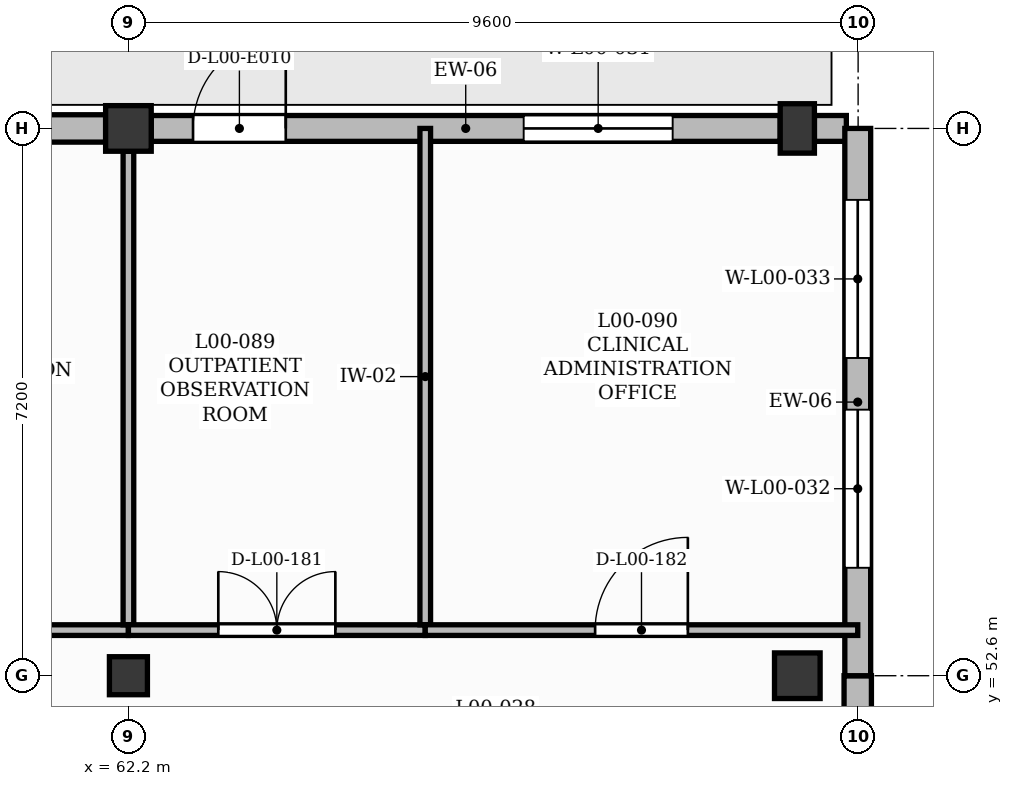
"""IFC4 building model, lengths in metres.
Left out: names, types, materials, properties, quantities, classifications, styles, units other than length and angle.
Written with IfcOpenShell. Run it as: python <this file> out.ifc"""

import sys

from ifc_helpers import new_model, si_unit, direction, frame, frame_2d, origin, origin_2d, place, context, subcontext, project, spatial, rectangle, extrude, element, fill, save


model = new_model("IFC4")
c1 = context("Model", 3, precision=1e-05, world=origin(), true_north=direction((0.0, 1.0)))
c2 = subcontext(c1, "Body", "Model", "MODEL_VIEW")
j1 = project(units=[si_unit("LENGTHUNIT", "METRE"), si_unit("PLANEANGLEUNIT", "RADIAN")], contexts=[c1])
p1 = place(None, origin())
s1 = spatial("IfcSite", under=j1, at=p1, CompositionType="ELEMENT")
p2 = place(p1, origin())
s2 = spatial("IfcBuilding", under=s1, at=p2, CompositionType="ELEMENT")
p3 = place(p2, origin())
s3 = spatial("IfcBuildingStorey", under=s2, at=p3, CompositionType="ELEMENT", Elevation=0.0)
p4 = place(p3, frame((62.2, 52.6, 0.0), z_axis=(0.0, 0.0, 1.0), x_axis=(1.0, 0.0, 0.0)))
e1 = element("IfcColumn", 1, at=p4, inside=s3, PredefinedType="COLUMN", context=c2, shape_type="SweptSolid", body=[
    extrude(rectangle(XDim=0.5, YDim=0.5, at=origin_2d()), origin(), (0.0, 0.0, 1.0), 4.2),
])
for number, where, z_axis, x_axis in (
    (2, (62.2, 59.8, 0.0), (0.0, 0.0, 1.0), (1.0, 0.0, 0.0)),
    (3, (71.0, 52.6, 0.0), (0.0, 0.0, 1.0), (1.0, 0.0, 0.0)),
):
    element("IfcColumn", number, at=place(p3, frame(where, z_axis=z_axis, x_axis=x_axis)), inside=s3, PredefinedType="COLUMN", context=c2, shape_type="SweptSolid", body=[
        extrude(rectangle(XDim=0.6, YDim=0.6, at=origin_2d()), origin(), (0.0, 0.0, 1.0), 4.2),
    ])
p5 = place(p3, frame((71.0, 59.8, 0.0), z_axis=(0.0, 0.0, 1.0), x_axis=(1.0, 0.0, 0.0)))
e4 = element("IfcColumn", 4, at=p5, inside=s3, PredefinedType="COLUMN", context=c2, shape_type="SweptSolid", body=[
    extrude(rectangle(XDim=0.45, YDim=0.65, at=origin_2d()), origin(), (0.0, 0.0, 1.0), 4.2),
])
p6 = place(p3, frame((58.775, 59.8, 0.0), z_axis=(0.0, 0.0, 1.0), x_axis=(1.0, 0.0, 0.0)))
e5 = element("IfcWall", 5, at=p6, inside=s3, PredefinedType="SOLIDWALL", context=c2, shape_type="SweptSolid", body=[
    extrude(rectangle(XDim=3.125, YDim=0.36, at=frame_2d((1.562, 0.0))), origin(), (0.0, 0.0, 1.0), 3.68),
])
p7 = place(p6, frame((0.812, 0.0, 1.5)))
e6 = element("IfcOpeningElement", 6, at=p7, cuts=e5, PredefinedType="OPENING", context=c2, shape_type="SweptSolid", body=[
    extrude(rectangle(XDim=1.5, YDim=1.25, at=frame_2d((0.75, 0.625))), frame((0.0, 0.19, 0.0), z_axis=(0.0, -1.0, 0.0), x_axis=(1.0, 0.0, 0.0)), (0.0, 0.0, 1.0), 0.38),
])
p8 = place(p3, frame((71.795, 45.4, 0.0), z_axis=(0.0, 0.0, 1.0), x_axis=(0.0, 1.0, 0.0)))
e7 = element("IfcWall", 7, at=p8, inside=s3, PredefinedType="SOLIDWALL", context=c2, shape_type="SweptSolid", body=[
    extrude(rectangle(XDim=7.2, YDim=0.36, at=frame_2d((3.6, 0.0))), origin(), (0.0, 0.0, 1.0), 4.2),
])
p9 = place(p8, frame((0.82, 0.0, 1.5)))
e8 = element("IfcOpeningElement", 8, at=p9, cuts=e7, PredefinedType="OPENING", context=c2, shape_type="SweptSolid", body=[
    extrude(rectangle(XDim=1.5, YDim=1.25, at=frame_2d((0.75, 0.625))), frame((0.0, 0.19, 0.0), z_axis=(0.0, -1.0, 0.0), x_axis=(1.0, 0.0, 0.0)), (0.0, 0.0, 1.0), 0.38),
])
p10 = place(p8, frame((3.0, 0.0, 1.5)))
e9 = element("IfcOpeningElement", 9, at=p10, cuts=e7, PredefinedType="OPENING", context=c2, shape_type="SweptSolid", body=[
    extrude(rectangle(XDim=1.5, YDim=1.25, at=frame_2d((0.75, 0.625))), frame((0.0, 0.19, 0.0), z_axis=(0.0, -1.0, 0.0), x_axis=(1.0, 0.0, 0.0)), (0.0, 0.0, 1.0), 0.38),
])
p11 = place(p3, frame((62.5, 59.8, 0.0), z_axis=(0.0, 0.0, 1.0), x_axis=(1.0, 0.0, 0.0)))
e10 = element("IfcWall", 10, at=p11, inside=s3, PredefinedType="SOLIDWALL", context=c2, shape_type="SweptSolid", body=[
    extrude(rectangle(XDim=8.275, YDim=0.34, at=frame_2d((4.137, 0.0))), origin(), (0.0, 0.0, 1.0), 3.68),
])
p12 = place(p11, frame((0.55, 0.0, 0.0)))
e11 = element("IfcOpeningElement", 11, at=p12, cuts=e10, PredefinedType="OPENING", context=c2, shape_type="SweptSolid", body=[
    extrude(rectangle(XDim=1.22, YDim=2.2, at=frame_2d((0.61, 1.1))), frame((0.0, 0.18, 0.0), z_axis=(0.0, -1.0, 0.0), x_axis=(1.0, 0.0, 0.0)), (0.0, 0.0, 1.0), 0.36),
])
p13 = place(p11, frame((4.9, 0.0, 1.05)))
e12 = element("IfcOpeningElement", 12, at=p13, cuts=e10, PredefinedType="OPENING", context=c2, shape_type="SweptSolid", body=[
    extrude(rectangle(XDim=1.96, YDim=1.65, at=frame_2d((0.98, 0.825))), frame((0.0, 0.18, 0.0), z_axis=(0.0, -1.0, 0.0), x_axis=(1.0, 0.0, 0.0)), (0.0, 0.0, 1.0), 0.36),
])
p14 = place(p3, frame((71.225, 59.8, 0.0), z_axis=(0.0, 0.0, 1.0), x_axis=(1.0, 0.0, 0.0)))
e13 = element("IfcWall", 13, at=p14, inside=s3, PredefinedType="SOLIDWALL", context=c2, shape_type="SweptSolid", body=[
    extrude(rectangle(XDim=0.42, YDim=0.34, at=frame_2d((0.21, 0.0))), origin(), (0.0, 0.0, 1.0), 4.2),
])
p15 = place(p3, frame((71.795, 52.6, 0.0), z_axis=(0.0, 0.0, 1.0), x_axis=(0.0, 1.0, 0.0)))
e14 = element("IfcWall", 14, at=p15, inside=s3, PredefinedType="SOLIDWALL", context=c2, shape_type="SweptSolid", body=[
    extrude(rectangle(XDim=7.2, YDim=0.34, at=frame_2d((3.6, 0.0))), origin(), (0.0, 0.0, 1.0), 4.2),
])
p16 = place(p15, frame((1.42, 0.0, 1.0)))
e15 = element("IfcOpeningElement", 15, at=p16, cuts=e14, PredefinedType="OPENING", context=c2, shape_type="SweptSolid", body=[
    extrude(rectangle(XDim=2.08, YDim=1.8, at=frame_2d((1.04, 0.9))), frame((0.0, 0.18, 0.0), z_axis=(0.0, -1.0, 0.0), x_axis=(1.0, 0.0, 0.0)), (0.0, 0.0, 1.0), 0.36),
])
p17 = place(p15, frame((4.18, 0.0, 1.0)))
e16 = element("IfcOpeningElement", 16, at=p17, cuts=e14, PredefinedType="OPENING", context=c2, shape_type="SweptSolid", body=[
    extrude(rectangle(XDim=2.08, YDim=1.8, at=frame_2d((1.04, 0.9))), frame((0.0, 0.18, 0.0), z_axis=(0.0, -1.0, 0.0), x_axis=(1.0, 0.0, 0.0)), (0.0, 0.0, 1.0), 0.36),
])
p18 = place(p3, frame((58.722, 53.2, 0.0), z_axis=(0.0, 0.0, 1.0), x_axis=(1.0, 0.0, 0.0)))
e17 = element("IfcWall", 17, at=p18, inside=s3, PredefinedType="PARTITIONING", context=c2, shape_type="SweptSolid", body=[
    extrude(rectangle(XDim=3.478, YDim=0.14, at=frame_2d((1.739, 0.0))), origin(), (0.0, 0.0, 1.0), 4.18),
])
p19 = place(p18, frame((1.249, 0.0, 0.0)))
e18 = element("IfcOpeningElement", 18, at=p19, cuts=e17, PredefinedType="OPENING", context=c2, shape_type="SweptSolid", body=[
    extrude(rectangle(XDim=0.98, YDim=2.15, at=frame_2d((0.49, 1.075))), frame((0.0, 0.08, 0.0), z_axis=(0.0, -1.0, 0.0), x_axis=(1.0, 0.0, 0.0)), (0.0, 0.0, 1.0), 0.16),
])
p20 = place(p3, frame((62.2, 53.27, 0.0), z_axis=(0.0, 0.0, 1.0), x_axis=(0.0, 1.0, 0.0)))
e19 = element("IfcWall", 19, at=p20, inside=s3, PredefinedType="PARTITIONING", context=c2, shape_type="SweptSolid", body=[
    extrude(rectangle(XDim=6.23, YDim=0.14, at=frame_2d((3.115, 0.0))), origin(), (0.0, 0.0, 1.0), 3.5),
])
p21 = place(p3, frame((62.2, 53.2, 0.0), z_axis=(0.0, 0.0, 1.0), x_axis=(1.0, 0.0, 0.0)))
e20 = element("IfcWall", 20, at=p21, inside=s3, PredefinedType="PARTITIONING", context=c2, shape_type="SweptSolid", body=[
    extrude(rectangle(XDim=3.905, YDim=0.14, at=frame_2d((1.953, 0.0))), origin(), (0.0, 0.0, 1.0), 4.18),
])
p22 = place(p21, frame((1.183, 0.0, 0.0)))
e21 = element("IfcOpeningElement", 21, at=p22, cuts=e20, PredefinedType="OPENING", context=c2, shape_type="SweptSolid", body=[
    extrude(rectangle(XDim=1.54, YDim=2.25, at=frame_2d((0.77, 1.125))), frame((0.0, 0.08, 0.0), z_axis=(0.0, -1.0, 0.0), x_axis=(1.0, 0.0, 0.0)), (0.0, 0.0, 1.0), 0.16),
])
p23 = place(p3, frame((66.105, 53.27, 0.0), z_axis=(0.0, 0.0, 1.0), x_axis=(0.0, 1.0, 0.0)))
e22 = element("IfcWall", 22, at=p23, inside=s3, PredefinedType="PARTITIONING", context=c2, shape_type="SweptSolid", body=[
    extrude(rectangle(XDim=6.53, YDim=0.14, at=frame_2d((3.265, 0.0))), origin(), (0.0, 0.0, 1.0), 4.18),
])
p24 = place(p3, frame((66.105, 53.2, 0.0), z_axis=(0.0, 0.0, 1.0), x_axis=(1.0, 0.0, 0.0)))
e23 = element("IfcWall", 23, at=p24, inside=s3, PredefinedType="PARTITIONING", context=c2, shape_type="SweptSolid", body=[
    extrude(rectangle(XDim=5.69, YDim=0.14, at=frame_2d((2.845, 0.0))), origin(), (0.0, 0.0, 1.0), 4.18),
])
p25 = place(p24, frame((2.235, 0.0, 0.0)))
e24 = element("IfcOpeningElement", 24, at=p25, cuts=e23, PredefinedType="OPENING", context=c2, shape_type="SweptSolid", body=[
    extrude(rectangle(XDim=1.22, YDim=2.1, at=frame_2d((0.61, 1.05))), frame((0.0, 0.08, 0.0), z_axis=(0.0, -1.0, 0.0), x_axis=(1.0, 0.0, 0.0)), (0.0, 0.0, 1.0), 0.16),
])
p26 = place(p12, origin())
e25 = element("IfcDoor", 25, at=p26, inside=s3, OperationType="SINGLE_SWING_RIGHT", PredefinedType="DOOR", context=c2, shape_type="SweptSolid", body=[
    extrude(rectangle(XDim=1.22, YDim=2.2, at=frame_2d((0.61, 1.1))), frame((0.0, 0.025, 0.0), z_axis=(0.0, -1.0, 0.0), x_axis=(1.0, 0.0, 0.0)), (0.0, 0.0, 1.0), 0.05),
])
fill(e11, e25)
p27 = place(p13, origin())
e26 = element("IfcWindow", 26, at=p27, inside=s3, PartitioningType="DOUBLE_PANEL_VERTICAL", PredefinedType="WINDOW", context=c2, shape_type="SweptSolid", body=[
    extrude(rectangle(XDim=1.96, YDim=1.65, at=frame_2d((0.98, 0.825))), frame((0.0, 0.03, 0.0), z_axis=(0.0, -1.0, 0.0), x_axis=(1.0, 0.0, 0.0)), (0.0, 0.0, 1.0), 0.06),
])
fill(e12, e26)
p28 = place(p16, origin())
e27 = element("IfcWindow", 27, at=p28, inside=s3, PartitioningType="DOUBLE_PANEL_VERTICAL", PredefinedType="WINDOW", context=c2, shape_type="SweptSolid", body=[
    extrude(rectangle(XDim=2.08, YDim=1.8, at=frame_2d((1.04, 0.9))), frame((0.0, 0.03, 0.0), z_axis=(0.0, -1.0, 0.0), x_axis=(1.0, 0.0, 0.0)), (0.0, 0.0, 1.0), 0.06),
])
fill(e15, e27)
p29 = place(p17, origin())
e28 = element("IfcWindow", 28, at=p29, inside=s3, PartitioningType="DOUBLE_PANEL_VERTICAL", PredefinedType="WINDOW", context=c2, shape_type="SweptSolid", body=[
    extrude(rectangle(XDim=2.08, YDim=1.8, at=frame_2d((1.04, 0.9))), frame((0.0, 0.03, 0.0), z_axis=(0.0, -1.0, 0.0), x_axis=(1.0, 0.0, 0.0)), (0.0, 0.0, 1.0), 0.06),
])
fill(e16, e28)
p30 = place(p22, origin())
e29 = element("IfcDoor", 29, at=p30, inside=s3, OperationType="DOUBLE_DOOR_SINGLE_SWING", PredefinedType="DOOR", context=c2, shape_type="SweptSolid", body=[
    extrude(rectangle(XDim=1.54, YDim=2.25, at=frame_2d((0.77, 1.125))), frame((0.0, 0.025, 0.0), z_axis=(0.0, -1.0, 0.0), x_axis=(1.0, 0.0, 0.0)), (0.0, 0.0, 1.0), 0.05),
])
fill(e21, e29)
p31 = place(p25, origin())
e30 = element("IfcDoor", 30, at=p31, inside=s3, OperationType="SINGLE_SWING_RIGHT", PredefinedType="DOOR", context=c2, shape_type="SweptSolid", body=[
    extrude(rectangle(XDim=1.22, YDim=2.1, at=frame_2d((0.61, 1.05))), frame((0.0, 0.025, 0.0), z_axis=(0.0, -1.0, 0.0), x_axis=(1.0, 0.0, 0.0)), (0.0, 0.0, 1.0), 0.05),
])
fill(e24, e30)
save(model, sys.argv[1])
